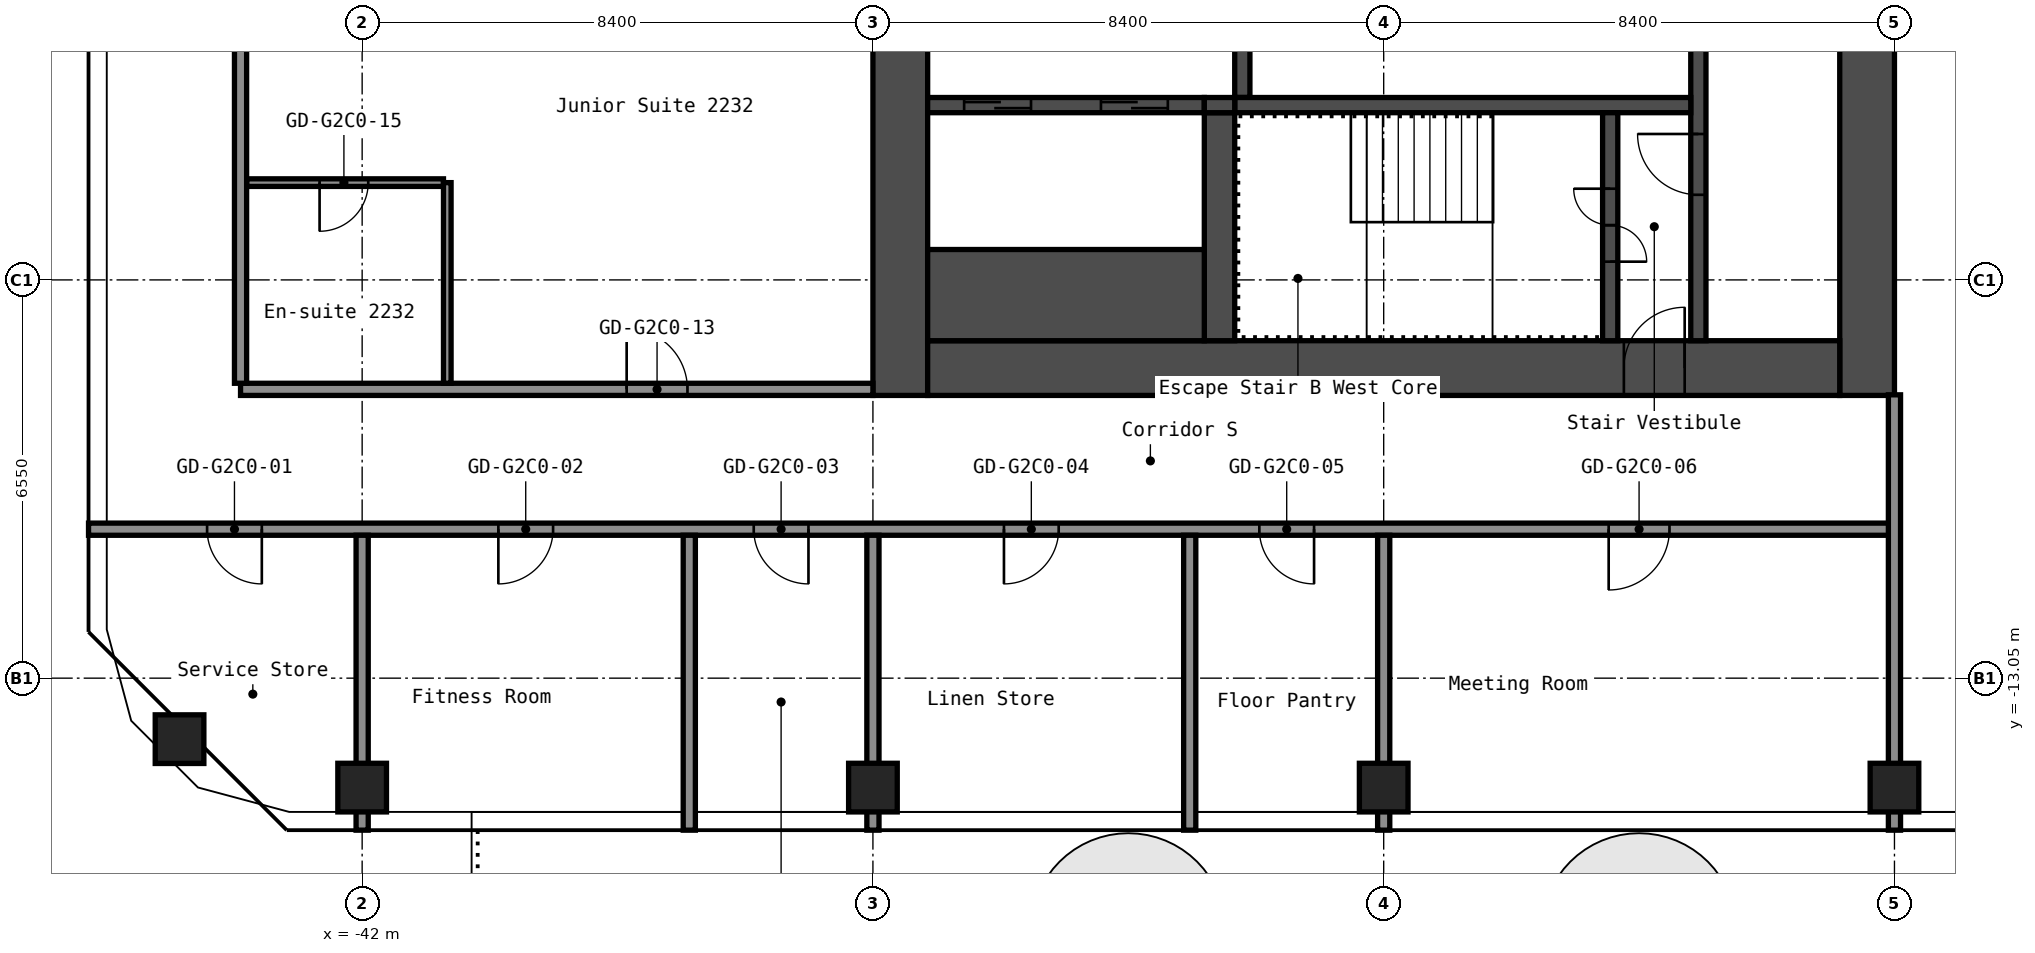
"""IFC4 building model, lengths in metres.
Left out: names, types, materials, properties, quantities, classifications, styles, units other than length and angle.
Written with IfcOpenShell. Run it as: python <this file> out.ifc"""

import sys

from ifc_helpers import new_model, si_unit, direction, frame, frame_2d, origin, origin_2d, place, context, subcontext, project, spatial, rectangle, hollow_rectangle, extrude, element, fill, save


model = new_model("IFC4")
c1 = context("Model", 3, precision=1e-05, world=origin(), true_north=direction((0.0, 1.0)))
c2 = subcontext(c1, "Body", "Model", "MODEL_VIEW")
j1 = project(units=[si_unit("LENGTHUNIT", "METRE"), si_unit("PLANEANGLEUNIT", "RADIAN")], contexts=[c1])
p1 = place(None, origin())
s1 = spatial("IfcSite", under=j1, at=p1, CompositionType="ELEMENT")
p2 = place(p1, origin())
s2 = spatial("IfcBuilding", under=s1, at=p2, CompositionType="ELEMENT")
p3 = place(p2, frame((0.0, 0.0, 81.8)))
s3 = spatial("IfcBuildingStorey", under=s2, at=p3, CompositionType="ELEMENT", Elevation=81.8)
for number, where, z_axis, x_axis in (
    (1, (-45.003, -14.053, 0.0), (0.0, 0.0, 1.0), (1.0, 0.0, 0.0)),
    (2, (-42.0, -14.85, 0.0), (0.0, 0.0, 1.0), (1.0, 0.0, 0.0)),
    (3, (-33.6, -14.85, 0.0), (0.0, 0.0, 1.0), (1.0, 0.0, 0.0)),
    (4, (-25.2, -14.85, 0.0), (0.0, 0.0, 1.0), (1.0, 0.0, 0.0)),
    (5, (-16.8, -14.85, 0.0), (0.0, 0.0, 1.0), (1.0, 0.0, 0.0)),
):
    element("IfcColumn", number, at=place(p3, frame(where, z_axis=z_axis, x_axis=x_axis)), inside=s3, PredefinedType="COLUMN", context=c2, shape_type="SweptSolid", body=[
        extrude(hollow_rectangle(XDim=0.8, YDim=0.8, WallThickness=0.032, at=origin_2d()), origin(), (0.0, 0.0, 1.0), 2.8),
    ])
p4 = place(p3, frame((-17.25, -8.4, 0.0), z_axis=(0.0, 0.0, 1.0), x_axis=(0.0, 1.0, 0.0)))
e6 = element("IfcWall", 6, at=p4, inside=s3, PredefinedType="SHEAR", context=c2, shape_type="SweptSolid", body=[
    extrude(rectangle(XDim=16.8, YDim=0.9, at=frame_2d((8.4, 0.0))), origin(), (0.0, 0.0, 1.0), 2.8),
])
p5 = place(p4, frame((7.6, 0.0, 0.0)))
e7 = element("IfcOpeningElement", 7, at=p5, cuts=e6, PredefinedType="OPENING", context=c2, shape_type="SweptSolid", body=[
    extrude(rectangle(XDim=1.2, YDim=2.1, at=frame_2d((0.6, 1.05))), frame((0.0, 0.46, 0.0), z_axis=(0.0, -1.0, 0.0), x_axis=(1.0, 0.0, 0.0)), (0.0, 0.0, 1.0), 0.92),
])
p6 = place(p3, frame((-33.15, -8.4, 0.0), z_axis=(0.0, 0.0, 1.0), x_axis=(0.0, 1.0, 0.0)))
e8 = element("IfcWall", 8, at=p6, inside=s3, PredefinedType="SHEAR", context=c2, shape_type="SweptSolid", body=[
    extrude(rectangle(XDim=16.8, YDim=0.9, at=frame_2d((8.4, 0.0))), origin(), (0.0, 0.0, 1.0), 2.8),
])
p7 = place(p3, frame((-32.7, -7.95, 0.0), z_axis=(0.0, 0.0, 1.0), x_axis=(1.0, 0.0, 0.0)))
e9 = element("IfcWall", 9, at=p7, inside=s3, PredefinedType="SHEAR", context=c2, shape_type="SweptSolid", body=[
    extrude(rectangle(XDim=15.0, YDim=0.9, at=frame_2d((7.5, 0.0))), origin(), (0.0, 0.0, 1.0), 2.8),
])
p8 = place(p7, frame((11.45, 0.0, 0.0)))
e10 = element("IfcOpeningElement", 10, at=p8, cuts=e9, PredefinedType="OPENING", context=c2, shape_type="SweptSolid", body=[
    extrude(rectangle(XDim=1.0, YDim=2.1, at=frame_2d((0.5, 1.05))), frame((0.0, 0.46, 0.0), z_axis=(0.0, -1.0, 0.0), x_axis=(1.0, 0.0, 0.0)), (0.0, 0.0, 1.0), 0.92),
])
p9 = place(p3, frame((-20.025, -7.5, 0.0), z_axis=(0.0, 0.0, 1.0), x_axis=(0.0, 1.0, 0.0)))
e11 = element("IfcWall", 11, at=p9, inside=s3, PredefinedType="SHEAR", context=c2, shape_type="SweptSolid", body=[
    extrude(rectangle(XDim=6.3, YDim=0.25, at=frame_2d((3.15, 0.0))), origin(), (0.0, 0.0, 1.0), 2.8),
])
p10 = place(p9, frame((2.4, 0.0, 0.0)))
e12 = element("IfcOpeningElement", 12, at=p10, cuts=e11, PredefinedType="OPENING", context=c2, shape_type="SweptSolid", body=[
    extrude(rectangle(XDim=1.0, YDim=2.1, at=frame_2d((0.5, 1.05))), frame((0.0, 0.135, 0.0), z_axis=(0.0, -1.0, 0.0), x_axis=(1.0, 0.0, 0.0)), (0.0, 0.0, 1.0), 0.27),
])
p11 = place(p3, frame((-27.525, -3.5, 0.0), z_axis=(0.0, 0.0, 1.0), x_axis=(0.0, 1.0, 0.0)))
e13 = element("IfcWall", 13, at=p11, inside=s3, PredefinedType="SHEAR", context=c2, shape_type="SweptSolid", body=[
    extrude(rectangle(XDim=2.05, YDim=0.25, at=frame_2d((1.025, 0.0))), origin(), (0.0, 0.0, 1.0), 2.8),
])
p12 = place(p3, frame((-27.65, -3.625, 0.0), z_axis=(0.0, 0.0, 1.0), x_axis=(1.0, 0.0, 0.0)))
e14 = element("IfcWall", 14, at=p12, inside=s3, PredefinedType="SHEAR", context=c2, shape_type="SweptSolid", body=[
    extrude(rectangle(XDim=7.5, YDim=0.25, at=frame_2d((3.75, 0.0))), origin(), (0.0, 0.0, 1.0), 2.8),
])
p13 = place(p3, frame((-21.475, -7.5, 0.0), z_axis=(0.0, 0.0, 1.0), x_axis=(0.0, 1.0, 0.0)))
e15 = element("IfcWall", 15, at=p13, inside=s3, PredefinedType="SHEAR", context=c2, shape_type="SweptSolid", body=[
    extrude(rectangle(XDim=3.75, YDim=0.25, at=frame_2d((1.875, 0.0))), origin(), (0.0, 0.0, 1.0), 2.8),
])
p14 = place(p13, frame((1.3, 0.0, 0.0)))
e16 = element("IfcOpeningElement", 16, at=p14, cuts=e15, PredefinedType="OPENING", context=c2, shape_type="SweptSolid", body=[
    extrude(rectangle(XDim=1.2, YDim=2.1, at=frame_2d((0.6, 1.05))), frame((0.0, 0.135, 0.0), z_axis=(0.0, -1.0, 0.0), x_axis=(1.0, 0.0, 0.0)), (0.0, 0.0, 1.0), 0.27),
])
p15 = place(p3, frame((-27.9, -7.5, 0.0), z_axis=(0.0, 0.0, 1.0), x_axis=(0.0, 1.0, 0.0)))
e17 = element("IfcWall", 17, at=p15, inside=s3, PredefinedType="SHEAR", context=c2, shape_type="SweptSolid", body=[
    extrude(rectangle(XDim=3.75, YDim=0.5, at=frame_2d((1.875, 0.0))), origin(), (0.0, 0.0, 1.0), 2.8),
])
p16 = place(p3, frame((-32.7, -3.625, 0.0), z_axis=(0.0, 0.0, 1.0), x_axis=(1.0, 0.0, 0.0)))
e18 = element("IfcWall", 18, at=p16, inside=s3, PredefinedType="SHEAR", context=c2, shape_type="SweptSolid", body=[
    extrude(rectangle(XDim=4.55, YDim=0.25, at=frame_2d((2.275, 0.0))), origin(), (0.0, 0.0, 1.0), 2.8),
])
p17 = place(p16, frame((2.85, 0.0, 0.0)))
e19 = element("IfcOpeningElement", 19, at=p17, cuts=e18, PredefinedType="OPENING", context=c2, shape_type="SweptSolid", body=[
    extrude(rectangle(XDim=1.1, YDim=2.1, at=frame_2d((0.55, 1.05))), frame((0.0, 0.135, 0.0), z_axis=(0.0, -1.0, 0.0), x_axis=(1.0, 0.0, 0.0)), (0.0, 0.0, 1.0), 0.27),
])
p18 = place(p16, frame((0.6, 0.0, 0.0)))
e20 = element("IfcOpeningElement", 20, at=p18, cuts=e18, PredefinedType="OPENING", context=c2, shape_type="SweptSolid", body=[
    extrude(rectangle(XDim=1.1, YDim=2.1, at=frame_2d((0.55, 1.05))), frame((0.0, 0.135, 0.0), z_axis=(0.0, -1.0, 0.0), x_axis=(1.0, 0.0, 0.0)), (0.0, 0.0, 1.0), 0.27),
])
p19 = place(p3, frame((-32.7, -6.75, 0.0), z_axis=(0.0, 0.0, 1.0), x_axis=(1.0, 0.0, 0.0)))
e21 = element("IfcWall", 21, at=p19, inside=s3, PredefinedType="SHEAR", context=c2, shape_type="SweptSolid", body=[
    extrude(rectangle(XDim=4.55, YDim=1.5, at=frame_2d((2.275, 0.0))), origin(), (0.0, 0.0, 1.0), 2.8),
])
p20 = place(p3, frame((-28.15, -3.625, 0.0), z_axis=(0.0, 0.0, 1.0), x_axis=(1.0, 0.0, 0.0)))
e22 = element("IfcWall", 22, at=p20, inside=s3, PredefinedType="SHEAR", context=c2, shape_type="SweptSolid", body=[
    extrude(rectangle(XDim=0.5, YDim=0.25, at=frame_2d((0.25, 0.0))), origin(), (0.0, 0.0, 1.0), 2.8),
])
p21 = place(p3, frame((-46.5, -10.6, 0.0), z_axis=(0.0, 0.0, 1.0), x_axis=(1.0, 0.0, 0.0)))
e23 = element("IfcWall", 23, at=p21, inside=s3, PredefinedType="PARTITIONING", context=c2, shape_type="SweptSolid", body=[
    extrude(rectangle(XDim=29.7, YDim=0.2, at=frame_2d((14.85, 0.0))), origin(), (0.0, 0.0, 1.0), 2.8),
])
p22 = place(p21, frame((1.95, 0.0, 0.0)))
e24 = element("IfcOpeningElement", 24, at=p22, cuts=e23, PredefinedType="OPENING", context=c2, shape_type="SweptSolid", body=[
    extrude(rectangle(XDim=0.9, YDim=2.1, at=frame_2d((0.45, 1.05))), frame((0.0, 0.11, 0.0), z_axis=(0.0, -1.0, 0.0), x_axis=(1.0, 0.0, 0.0)), (0.0, 0.0, 1.0), 0.22),
])
p23 = place(p21, frame((6.74, 0.0, 0.0)))
e25 = element("IfcOpeningElement", 25, at=p23, cuts=e23, PredefinedType="OPENING", context=c2, shape_type="SweptSolid", body=[
    extrude(rectangle(XDim=0.9, YDim=2.1, at=frame_2d((0.45, 1.05))), frame((0.0, 0.11, 0.0), z_axis=(0.0, -1.0, 0.0), x_axis=(1.0, 0.0, 0.0)), (0.0, 0.0, 1.0), 0.22),
])
p24 = place(p21, frame((10.94, 0.0, 0.0)))
e26 = element("IfcOpeningElement", 26, at=p24, cuts=e23, PredefinedType="OPENING", context=c2, shape_type="SweptSolid", body=[
    extrude(rectangle(XDim=0.9, YDim=2.1, at=frame_2d((0.45, 1.05))), frame((0.0, 0.11, 0.0), z_axis=(0.0, -1.0, 0.0), x_axis=(1.0, 0.0, 0.0)), (0.0, 0.0, 1.0), 0.22),
])
p25 = place(p21, frame((15.055, 0.0, 0.0)))
e27 = element("IfcOpeningElement", 27, at=p25, cuts=e23, PredefinedType="OPENING", context=c2, shape_type="SweptSolid", body=[
    extrude(rectangle(XDim=0.9, YDim=2.1, at=frame_2d((0.45, 1.05))), frame((0.0, 0.11, 0.0), z_axis=(0.0, -1.0, 0.0), x_axis=(1.0, 0.0, 0.0)), (0.0, 0.0, 1.0), 0.22),
])
p26 = place(p21, frame((19.255, 0.0, 0.0)))
e28 = element("IfcOpeningElement", 28, at=p26, cuts=e23, PredefinedType="OPENING", context=c2, shape_type="SweptSolid", body=[
    extrude(rectangle(XDim=0.9, YDim=2.1, at=frame_2d((0.45, 1.05))), frame((0.0, 0.11, 0.0), z_axis=(0.0, -1.0, 0.0), x_axis=(1.0, 0.0, 0.0)), (0.0, 0.0, 1.0), 0.22),
])
p27 = place(p21, frame((25.0, 0.0, 0.0)))
e29 = element("IfcOpeningElement", 29, at=p27, cuts=e23, PredefinedType="OPENING", context=c2, shape_type="SweptSolid", body=[
    extrude(rectangle(XDim=1.0, YDim=2.1, at=frame_2d((0.5, 1.05))), frame((0.0, 0.11, 0.0), z_axis=(0.0, -1.0, 0.0), x_axis=(1.0, 0.0, 0.0)), (0.0, 0.0, 1.0), 0.22),
])
p28 = place(p3, frame((-44.0, -8.3, 0.0), z_axis=(0.0, 0.0, 1.0), x_axis=(1.0, 0.0, 0.0)))
e30 = element("IfcWall", 30, at=p28, inside=s3, PredefinedType="PARTITIONING", context=c2, shape_type="SweptSolid", body=[
    extrude(rectangle(XDim=10.4, YDim=0.2, at=frame_2d((5.2, 0.0))), origin(), (0.0, 0.0, 1.0), 2.8),
])
p29 = place(p28, frame((6.35, 0.0, 0.0)))
e31 = element("IfcOpeningElement", 31, at=p29, cuts=e30, PredefinedType="OPENING", context=c2, shape_type="SweptSolid", body=[
    extrude(rectangle(XDim=1.0, YDim=2.1, at=frame_2d((0.5, 1.05))), frame((0.0, 0.11, 0.0), z_axis=(0.0, -1.0, 0.0), x_axis=(1.0, 0.0, 0.0)), (0.0, 0.0, 1.0), 0.22),
])
p30 = place(p3, frame((-43.9, -4.9, 0.0), z_axis=(0.0, 0.0, 1.0), x_axis=(1.0, 0.0, 0.0)))
e32 = element("IfcWall", 32, at=p30, inside=s3, PredefinedType="PARTITIONING", context=c2, shape_type="SweptSolid", body=[
    extrude(rectangle(XDim=3.237, YDim=0.125, at=frame_2d((1.619, 0.0))), origin(), (0.0, 0.0, 1.0), 2.8),
])
p31 = place(p30, frame((1.2, 0.0, 0.0)))
e33 = element("IfcOpeningElement", 33, at=p31, cuts=e32, PredefinedType="OPENING", context=c2, shape_type="SweptSolid", body=[
    extrude(rectangle(XDim=0.8, YDim=2.1, at=frame_2d((0.4, 1.05))), frame((0.0, 0.073, 0.0), z_axis=(0.0, -1.0, 0.0), x_axis=(1.0, 0.0, 0.0)), (0.0, 0.0, 1.0), 0.145),
])
p32 = place(p3, frame((-44.0, -8.2, 0.0), z_axis=(0.0, 0.0, 1.0), x_axis=(0.0, 1.0, 0.0)))
e34 = element("IfcWall", 34, at=p32, inside=s3, PredefinedType="PARTITIONING", context=c2, shape_type="SweptSolid", body=[
    extrude(rectangle(XDim=16.4, YDim=0.2, at=frame_2d((8.2, 0.0))), origin(), (0.0, 0.0, 1.0), 2.8),
])
p33 = place(p3, frame((-42.0, -15.55, 0.0), z_axis=(0.0, 0.0, 1.0), x_axis=(0.0, 1.0, 0.0)))
e35 = element("IfcWall", 35, at=p33, inside=s3, PredefinedType="PARTITIONING", context=c2, shape_type="SweptSolid", body=[
    extrude(rectangle(XDim=4.85, YDim=0.2, at=frame_2d((2.425, 0.0))), origin(), (0.0, 0.0, 1.0), 2.8),
])
p34 = place(p3, frame((-40.6, -8.2, 0.0), z_axis=(0.0, 0.0, 1.0), x_axis=(0.0, 1.0, 0.0)))
e36 = element("IfcWall", 36, at=p34, inside=s3, PredefinedType="PARTITIONING", context=c2, shape_type="SweptSolid", body=[
    extrude(rectangle(XDim=3.3, YDim=0.125, at=frame_2d((1.65, 0.0))), origin(), (0.0, 0.0, 1.0), 2.8),
])
for number, where, z_axis, x_axis in (
    (37, (-36.62, -15.55, 0.0), (0.0, 0.0, 1.0), (0.0, 1.0, 0.0)),
    (38, (-33.6, -15.55, 0.0), (0.0, 0.0, 1.0), (0.0, 1.0, 0.0)),
    (39, (-28.39, -15.55, 0.0), (0.0, 0.0, 1.0), (0.0, 1.0, 0.0)),
    (40, (-25.2, -15.55, 0.0), (0.0, 0.0, 1.0), (0.0, 1.0, 0.0)),
):
    element("IfcWall", number, at=place(p3, frame(where, z_axis=z_axis, x_axis=x_axis)), inside=s3, PredefinedType="PARTITIONING", context=c2, shape_type="SweptSolid", body=[
        extrude(rectangle(XDim=4.85, YDim=0.2, at=frame_2d((2.425, 0.0))), origin(), (0.0, 0.0, 1.0), 2.8),
    ])
p35 = place(p3, frame((-16.8, -15.55, 0.0), z_axis=(0.0, 0.0, 1.0), x_axis=(0.0, 1.0, 0.0)))
e41 = element("IfcWall", 41, at=p35, inside=s3, PredefinedType="PARTITIONING", context=c2, shape_type="SweptSolid", body=[
    extrude(rectangle(XDim=7.16, YDim=0.2, at=frame_2d((3.58, 0.0))), origin(), (0.0, 0.0, 1.0), 2.8),
])
p36 = place(p8, origin())
e42 = element("IfcDoor", 42, at=p36, inside=s3, OperationType="SINGLE_SWING_LEFT", PredefinedType="DOOR", context=c2, shape_type="SweptSolid", body=[
    extrude(rectangle(XDim=1.0, YDim=2.1, at=frame_2d((0.5, 1.05))), frame((0.0, 0.025, 0.0), z_axis=(0.0, -1.0, 0.0), x_axis=(1.0, 0.0, 0.0)), (0.0, 0.0, 1.0), 0.05),
])
fill(e10, e42)
p37 = place(p14, origin())
e43 = element("IfcDoor", 43, at=p37, inside=s3, OperationType="DOUBLE_DOOR_SINGLE_SWING", PredefinedType="DOOR", context=c2, shape_type="SweptSolid", body=[
    extrude(rectangle(XDim=1.2, YDim=2.1, at=frame_2d((0.6, 1.05))), frame((0.0, 0.025, 0.0), z_axis=(0.0, -1.0, 0.0), x_axis=(1.0, 0.0, 0.0)), (0.0, 0.0, 1.0), 0.05),
])
fill(e16, e43)
p38 = place(p10, origin())
e44 = element("IfcDoor", 44, at=p38, inside=s3, OperationType="SINGLE_SWING_LEFT", PredefinedType="DOOR", context=c2, shape_type="SweptSolid", body=[
    extrude(rectangle(XDim=1.0, YDim=2.1, at=frame_2d((0.5, 1.05))), frame((0.0, 0.025, 0.0), z_axis=(0.0, -1.0, 0.0), x_axis=(1.0, 0.0, 0.0)), (0.0, 0.0, 1.0), 0.05),
])
fill(e12, e44)
p39 = place(p17, origin())
e45 = element("IfcDoor", 45, at=p39, inside=s3, OperationType="DOUBLE_DOOR_SLIDING", PredefinedType="DOOR", context=c2, shape_type="SweptSolid", body=[
    extrude(rectangle(XDim=1.1, YDim=2.1, at=frame_2d((0.55, 1.05))), frame((0.0, 0.025, 0.0), z_axis=(0.0, -1.0, 0.0), x_axis=(1.0, 0.0, 0.0)), (0.0, 0.0, 1.0), 0.05),
])
fill(e19, e45)
p40 = place(p18, origin())
e46 = element("IfcDoor", 46, at=p40, inside=s3, OperationType="DOUBLE_DOOR_SLIDING", PredefinedType="DOOR", context=c2, shape_type="SweptSolid", body=[
    extrude(rectangle(XDim=1.1, YDim=2.1, at=frame_2d((0.55, 1.05))), frame((0.0, 0.025, 0.0), z_axis=(0.0, -1.0, 0.0), x_axis=(1.0, 0.0, 0.0)), (0.0, 0.0, 1.0), 0.05),
])
fill(e20, e46)
p41 = place(p22, origin())
e47 = element("IfcDoor", 47, at=p41, inside=s3, OperationType="SINGLE_SWING_RIGHT", PredefinedType="DOOR", context=c2, shape_type="SweptSolid", body=[
    extrude(rectangle(XDim=0.9, YDim=2.1, at=frame_2d((0.45, 1.05))), frame((0.0, 0.025, 0.0), z_axis=(0.0, -1.0, 0.0), x_axis=(1.0, 0.0, 0.0)), (0.0, 0.0, 1.0), 0.05),
])
fill(e24, e47)
p42 = place(p23, origin())
e48 = element("IfcDoor", 48, at=p42, inside=s3, OperationType="SINGLE_SWING_LEFT", PredefinedType="DOOR", context=c2, shape_type="SweptSolid", body=[
    extrude(rectangle(XDim=0.9, YDim=2.1, at=frame_2d((0.45, 1.05))), frame((0.0, 0.025, 0.0), z_axis=(0.0, -1.0, 0.0), x_axis=(1.0, 0.0, 0.0)), (0.0, 0.0, 1.0), 0.05),
])
fill(e25, e48)
p43 = place(p24, origin())
e49 = element("IfcDoor", 49, at=p43, inside=s3, OperationType="SINGLE_SWING_RIGHT", PredefinedType="DOOR", context=c2, shape_type="SweptSolid", body=[
    extrude(rectangle(XDim=0.9, YDim=2.1, at=frame_2d((0.45, 1.05))), frame((0.0, 0.025, 0.0), z_axis=(0.0, -1.0, 0.0), x_axis=(1.0, 0.0, 0.0)), (0.0, 0.0, 1.0), 0.05),
])
fill(e26, e49)
p44 = place(p25, origin())
e50 = element("IfcDoor", 50, at=p44, inside=s3, OperationType="SINGLE_SWING_LEFT", PredefinedType="DOOR", context=c2, shape_type="SweptSolid", body=[
    extrude(rectangle(XDim=0.9, YDim=2.1, at=frame_2d((0.45, 1.05))), frame((0.0, 0.025, 0.0), z_axis=(0.0, -1.0, 0.0), x_axis=(1.0, 0.0, 0.0)), (0.0, 0.0, 1.0), 0.05),
])
fill(e27, e50)
p45 = place(p26, origin())
e51 = element("IfcDoor", 51, at=p45, inside=s3, OperationType="SINGLE_SWING_RIGHT", PredefinedType="DOOR", context=c2, shape_type="SweptSolid", body=[
    extrude(rectangle(XDim=0.9, YDim=2.1, at=frame_2d((0.45, 1.05))), frame((0.0, 0.025, 0.0), z_axis=(0.0, -1.0, 0.0), x_axis=(1.0, 0.0, 0.0)), (0.0, 0.0, 1.0), 0.05),
])
fill(e28, e51)
p46 = place(p27, origin())
e52 = element("IfcDoor", 52, at=p46, inside=s3, OperationType="SINGLE_SWING_LEFT", PredefinedType="DOOR", context=c2, shape_type="SweptSolid", body=[
    extrude(rectangle(XDim=1.0, YDim=2.1, at=frame_2d((0.5, 1.05))), frame((0.0, 0.025, 0.0), z_axis=(0.0, -1.0, 0.0), x_axis=(1.0, 0.0, 0.0)), (0.0, 0.0, 1.0), 0.05),
])
fill(e29, e52)
p47 = place(p29, origin())
e53 = element("IfcDoor", 53, at=p47, inside=s3, OperationType="SINGLE_SWING_RIGHT", PredefinedType="DOOR", context=c2, shape_type="SweptSolid", body=[
    extrude(rectangle(XDim=1.0, YDim=2.1, at=frame_2d((0.5, 1.05))), frame((0.0, 0.025, 0.0), z_axis=(0.0, -1.0, 0.0), x_axis=(1.0, 0.0, 0.0)), (0.0, 0.0, 1.0), 0.05),
])
fill(e31, e53)
p48 = place(p31, origin())
e54 = element("IfcDoor", 54, at=p48, inside=s3, OperationType="SINGLE_SWING_LEFT", PredefinedType="DOOR", context=c2, shape_type="SweptSolid", body=[
    extrude(rectangle(XDim=0.8, YDim=2.1, at=frame_2d((0.4, 1.05))), frame((0.0, 0.025, 0.0), z_axis=(0.0, -1.0, 0.0), x_axis=(1.0, 0.0, 0.0)), (0.0, 0.0, 1.0), 0.05),
])
fill(e33, e54)
save(model, sys.argv[1])
